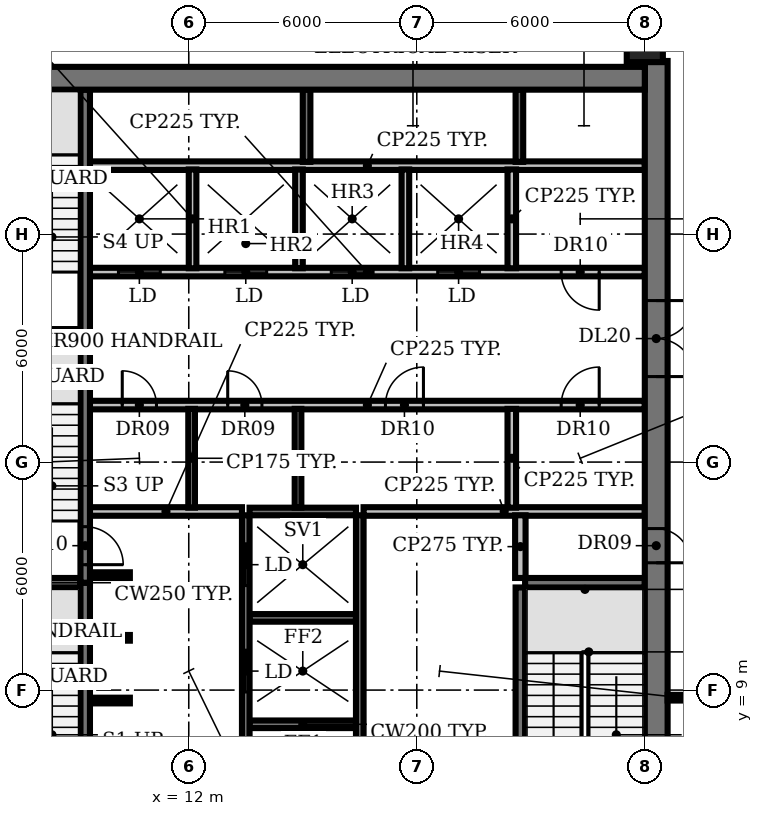
"""IFC4 building model, lengths in metres.
Left out: names, types, materials, properties, quantities, classifications, styles, units other than length and angle.
Written with IfcOpenShell. Run it as: python <this file> out.ifc"""

import sys

from ifc_helpers import new_model, si_unit, direction, frame, frame_2d, origin, origin_2d, place, context, subcontext, project, spatial, rectangle, circle, extrude, element, fill, save


model = new_model("IFC4")
c1 = context("Model", 3, precision=1e-05, world=origin(), true_north=direction((0.0, 1.0)))
c2 = subcontext(c1, "Body", "Model", "MODEL_VIEW")
j1 = project(units=[si_unit("LENGTHUNIT", "METRE"), si_unit("PLANEANGLEUNIT", "RADIAN")], contexts=[c1])
p1 = place(None, origin())
s1 = spatial("IfcSite", under=j1, at=p1, CompositionType="ELEMENT")
p2 = place(p1, origin())
s2 = spatial("IfcBuilding", under=s1, at=p2, CompositionType="ELEMENT")
p3 = place(p2, frame((0.0, 0.0, 188.6)))
s3 = spatial("IfcBuildingStorey", under=s2, at=p3, CompositionType="ELEMENT", Elevation=188.6)
p4 = place(p3, frame((24.0, 26.0, 0.0), z_axis=(0.0, 0.0, 1.0), x_axis=(1.0, 0.0, 0.0)))
e1 = element("IfcColumn", 1, at=p4, inside=s3, PredefinedType="COLUMN", context=c2, shape_type="SweptSolid", body=[
    extrude(circle(Radius=0.475, at=origin_2d()), origin(), (0.0, 0.0, 1.0), 3.85),
])
p5 = place(p3, frame((13.6, 8.1, 0.0), z_axis=(0.0, 0.0, 1.0), x_axis=(1.0, 0.0, 0.0)))
e2 = element("IfcWall", 2, at=p5, inside=s3, PredefinedType="SHEAR", context=c2, shape_type="SweptSolid", body=[
    extrude(rectangle(XDim=2.8, YDim=0.2, at=frame_2d((1.4, 0.0))), origin(), (0.0, 0.0, 1.0), 3.85),
])
for number, where, z_axis, x_axis in (
    (3, (9.4, 8.725, 0.0), (0.0, 0.0, 1.0), (1.0, 0.0, 0.0)),
    (4, (9.4, 10.375, 0.0), (0.0, 0.0, 1.0), (1.0, 0.0, 0.0)),
):
    element("IfcWall", number, at=place(p3, frame(where, z_axis=z_axis, x_axis=x_axis)), inside=s3, PredefinedType="SHEAR", context=c2, shape_type="SweptSolid", body=[
        extrude(rectangle(XDim=1.05, YDim=0.15, at=frame_2d((0.525, 0.0))), origin(), (0.0, 0.0, 1.0), 3.85),
    ])
p6 = place(p3, frame((13.6, 10.9, 0.0), z_axis=(0.0, 0.0, 1.0), x_axis=(1.0, 0.0, 0.0)))
e5 = element("IfcWall", 5, at=p6, inside=s3, PredefinedType="SHEAR", context=c2, shape_type="SweptSolid", body=[
    extrude(rectangle(XDim=2.8, YDim=0.2, at=frame_2d((1.4, 0.0))), origin(), (0.0, 0.0, 1.0), 3.85),
])
for number, where, z_axis, x_axis in (
    (6, (6.0, 11.825, 0.0), (0.0, 0.0, 1.0), (1.0, 0.0, 0.0)),
    (7, (20.85, 11.825, 0.0), (0.0, 0.0, 1.0), (1.0, 0.0, 0.0)),
):
    element("IfcWall", number, at=place(p3, frame(where, z_axis=z_axis, x_axis=x_axis)), inside=s3, PredefinedType="SHEAR", context=c2, shape_type="SweptSolid", body=[
        extrude(rectangle(XDim=3.15, YDim=0.25, at=frame_2d((1.575, 0.0))), origin(), (0.0, 0.0, 1.0), 3.85),
    ])
p7 = place(p3, frame((9.4, 12.025, 0.0), z_axis=(0.0, 0.0, 1.0), x_axis=(1.0, 0.0, 0.0)))
e8 = element("IfcWall", 8, at=p7, inside=s3, PredefinedType="SHEAR", context=c2, shape_type="SweptSolid", body=[
    extrude(rectangle(XDim=1.05, YDim=0.15, at=frame_2d((0.525, 0.0))), origin(), (0.0, 0.0, 1.0), 3.85),
])
p8 = place(p3, frame((9.4, 13.7, 0.0), z_axis=(0.0, 0.0, 1.0), x_axis=(1.0, 0.0, 0.0)))
e9 = element("IfcWall", 9, at=p8, inside=s3, PredefinedType="PARTITIONING", context=c2, shape_type="SweptSolid", body=[
    extrude(rectangle(XDim=4.0, YDim=0.225, at=frame_2d((2.0, 0.0))), origin(), (0.0, 0.0, 1.0), 3.85),
])
p9 = place(p3, frame((13.6, 13.7, 0.0), z_axis=(0.0, 0.0, 1.0), x_axis=(1.0, 0.0, 0.0)))
e10 = element("IfcWall", 10, at=p9, inside=s3, PredefinedType="SHEAR", context=c2, shape_type="SweptSolid", body=[
    extrude(rectangle(XDim=2.8, YDim=0.2, at=frame_2d((1.4, 0.0))), origin(), (0.0, 0.0, 1.0), 3.85),
])
p10 = place(p3, frame((16.6, 13.7, 0.0), z_axis=(0.0, 0.0, 1.0), x_axis=(1.0, 0.0, 0.0)))
e11 = element("IfcWall", 11, at=p10, inside=s3, PredefinedType="PARTITIONING", context=c2, shape_type="SweptSolid", body=[
    extrude(rectangle(XDim=7.4, YDim=0.225, at=frame_2d((3.7, 0.0))), origin(), (0.0, 0.0, 1.0), 3.85),
])
p11 = place(p3, frame((9.4, 16.5, 0.0), z_axis=(0.0, 0.0, 1.0), x_axis=(1.0, 0.0, 0.0)))
e12 = element("IfcWall", 12, at=p11, inside=s3, PredefinedType="PARTITIONING", context=c2, shape_type="SweptSolid", body=[
    extrude(rectangle(XDim=14.6, YDim=0.225, at=frame_2d((7.3, 0.0))), origin(), (0.0, 0.0, 1.0), 3.85),
])
p12 = place(p11, frame((0.85, 0.0, 0.0)))
e13 = element("IfcOpeningElement", 13, at=p12, cuts=e12, PredefinedType="OPENING", context=c2, shape_type="SweptSolid", body=[
    extrude(rectangle(XDim=0.9, YDim=2.1, at=frame_2d((0.45, 1.05))), frame((0.0, 0.123, 0.0), z_axis=(0.0, -1.0, 0.0), x_axis=(1.0, 0.0, 0.0)), (0.0, 0.0, 1.0), 0.245),
])
p13 = place(p11, frame((3.625, 0.0, 0.0)))
e14 = element("IfcOpeningElement", 14, at=p13, cuts=e12, PredefinedType="OPENING", context=c2, shape_type="SweptSolid", body=[
    extrude(rectangle(XDim=0.9, YDim=2.1, at=frame_2d((0.45, 1.05))), frame((0.0, 0.123, 0.0), z_axis=(0.0, -1.0, 0.0), x_axis=(1.0, 0.0, 0.0)), (0.0, 0.0, 1.0), 0.245),
])
p14 = place(p11, frame((7.775, 0.0, 0.0)))
e15 = element("IfcOpeningElement", 15, at=p14, cuts=e12, PredefinedType="OPENING", context=c2, shape_type="SweptSolid", body=[
    extrude(rectangle(XDim=1.0, YDim=2.1, at=frame_2d((0.5, 1.05))), frame((0.0, 0.123, 0.0), z_axis=(0.0, -1.0, 0.0), x_axis=(1.0, 0.0, 0.0)), (0.0, 0.0, 1.0), 0.245),
])
p15 = place(p11, frame((12.4, 0.0, 0.0)))
e16 = element("IfcOpeningElement", 16, at=p15, cuts=e12, PredefinedType="OPENING", context=c2, shape_type="SweptSolid", body=[
    extrude(rectangle(XDim=1.0, YDim=2.1, at=frame_2d((0.5, 1.05))), frame((0.0, 0.123, 0.0), z_axis=(0.0, -1.0, 0.0), x_axis=(1.0, 0.0, 0.0)), (0.0, 0.0, 1.0), 0.245),
])
p16 = place(p3, frame((6.0, 18.375, 0.0), z_axis=(0.0, 0.0, 1.0), x_axis=(1.0, 0.0, 0.0)))
e17 = element("IfcWall", 17, at=p16, inside=s3, PredefinedType="SHEAR", context=c2, shape_type="SweptSolid", body=[
    extrude(rectangle(XDim=3.15, YDim=0.25, at=frame_2d((1.575, 0.0))), origin(), (0.0, 0.0, 1.0), 3.85),
])
p17 = place(p3, frame((24.0, 20.0, 0.0), z_axis=(0.0, 0.0, 1.0), x_axis=(-1.0, 0.0, 0.0)))
e18 = element("IfcWall", 18, at=p17, inside=s3, PredefinedType="PARTITIONING", context=c2, shape_type="SweptSolid", body=[
    extrude(rectangle(XDim=14.6, YDim=0.225, at=frame_2d((7.3, 0.0))), origin(), (0.0, 0.0, 1.0), 3.85),
])
p18 = place(p17, frame((12.75, 0.0, 0.0)))
e19 = element("IfcOpeningElement", 19, at=p18, cuts=e18, PredefinedType="OPENING", context=c2, shape_type="SweptSolid", body=[
    extrude(rectangle(XDim=1.1, YDim=2.1, at=frame_2d((0.55, 1.05))), frame((0.0, 0.123, 0.0), z_axis=(0.0, -1.0, 0.0), x_axis=(1.0, 0.0, 0.0)), (0.0, 0.0, 1.0), 0.245),
])
p19 = place(p17, frame((9.95, 0.0, 0.0)))
e20 = element("IfcOpeningElement", 20, at=p19, cuts=e18, PredefinedType="OPENING", context=c2, shape_type="SweptSolid", body=[
    extrude(rectangle(XDim=1.1, YDim=2.1, at=frame_2d((0.55, 1.05))), frame((0.0, 0.123, 0.0), z_axis=(0.0, -1.0, 0.0), x_axis=(1.0, 0.0, 0.0)), (0.0, 0.0, 1.0), 0.245),
])
p20 = place(p17, frame((7.15, 0.0, 0.0)))
e21 = element("IfcOpeningElement", 21, at=p20, cuts=e18, PredefinedType="OPENING", context=c2, shape_type="SweptSolid", body=[
    extrude(rectangle(XDim=1.1, YDim=2.1, at=frame_2d((0.55, 1.05))), frame((0.0, 0.123, 0.0), z_axis=(0.0, -1.0, 0.0), x_axis=(1.0, 0.0, 0.0)), (0.0, 0.0, 1.0), 0.245),
])
p21 = place(p17, frame((4.35, 0.0, 0.0)))
e22 = element("IfcOpeningElement", 22, at=p21, cuts=e18, PredefinedType="OPENING", context=c2, shape_type="SweptSolid", body=[
    extrude(rectangle(XDim=1.1, YDim=2.1, at=frame_2d((0.55, 1.05))), frame((0.0, 0.123, 0.0), z_axis=(0.0, -1.0, 0.0), x_axis=(1.0, 0.0, 0.0)), (0.0, 0.0, 1.0), 0.245),
])
p22 = place(p17, frame((1.2, 0.0, 0.0)))
e23 = element("IfcOpeningElement", 23, at=p22, cuts=e18, PredefinedType="OPENING", context=c2, shape_type="SweptSolid", body=[
    extrude(rectangle(XDim=1.0, YDim=2.1, at=frame_2d((0.5, 1.05))), frame((0.0, 0.123, 0.0), z_axis=(0.0, -1.0, 0.0), x_axis=(1.0, 0.0, 0.0)), (0.0, 0.0, 1.0), 0.245),
])
p23 = place(p3, frame((9.4, 22.8, 0.0), z_axis=(0.0, 0.0, 1.0), x_axis=(1.0, 0.0, 0.0)))
e24 = element("IfcWall", 24, at=p23, inside=s3, PredefinedType="PARTITIONING", context=c2, shape_type="SweptSolid", body=[
    extrude(rectangle(XDim=14.6, YDim=0.225, at=frame_2d((7.3, 0.0))), origin(), (0.0, 0.0, 1.0), 3.85),
])
p24 = place(p3, frame((9.275, 11.825, 0.0), z_axis=(0.0, 0.0, 1.0), x_axis=(0.0, -1.0, 0.0)))
e25 = element("IfcWall", 25, at=p24, inside=s3, PredefinedType="SHEAR", context=c2, shape_type="SweptSolid", body=[
    extrude(rectangle(XDim=6.425, YDim=0.25, at=frame_2d((3.212, 0.0))), origin(), (0.0, 0.0, 1.0), 3.85),
])
p25 = place(p24, frame((5.075, 0.0, 0.0)))
e26 = element("IfcOpeningElement", 26, at=p25, cuts=e25, PredefinedType="OPENING", context=c2, shape_type="SweptSolid", body=[
    extrude(rectangle(XDim=1.0, YDim=2.1, at=frame_2d((0.5, 1.05))), frame((0.0, 0.135, 0.0), z_axis=(0.0, -1.0, 0.0), x_axis=(1.0, 0.0, 0.0)), (0.0, 0.0, 1.0), 0.27),
])
p26 = place(p3, frame((9.275, 18.375, 0.0), z_axis=(0.0, 0.0, 1.0), x_axis=(0.0, -1.0, 0.0)))
e27 = element("IfcWall", 27, at=p26, inside=s3, PredefinedType="SHEAR", context=c2, shape_type="SweptSolid", body=[
    extrude(rectangle(XDim=6.55, YDim=0.25, at=frame_2d((3.275, 0.0))), origin(), (0.0, 0.0, 1.0), 3.85),
])
p27 = place(p26, frame((5.075, 0.0, 0.0)))
e28 = element("IfcOpeningElement", 28, at=p27, cuts=e27, PredefinedType="OPENING", context=c2, shape_type="SweptSolid", body=[
    extrude(rectangle(XDim=1.0, YDim=2.1, at=frame_2d((0.5, 1.05))), frame((0.0, 0.135, 0.0), z_axis=(0.0, -1.0, 0.0), x_axis=(1.0, 0.0, 0.0)), (0.0, 0.0, 1.0), 0.27),
])
p28 = place(p3, frame((9.275, 18.375, 0.0), z_axis=(0.0, 0.0, 1.0), x_axis=(0.0, 1.0, 0.0)))
e29 = element("IfcWall", 29, at=p28, inside=s3, PredefinedType="SHEAR", context=c2, shape_type="SweptSolid", body=[
    extrude(rectangle(XDim=6.425, YDim=0.25, at=frame_2d((3.212, 0.0))), origin(), (0.0, 0.0, 1.0), 3.85),
])
p29 = place(p3, frame((12.075, 13.8, 0.0), z_axis=(0.0, 0.0, 1.0), x_axis=(0.0, 1.0, 0.0)))
e30 = element("IfcWall", 30, at=p29, inside=s3, PredefinedType="PARTITIONING", context=c2, shape_type="SweptSolid", body=[
    extrude(rectangle(XDim=2.6, YDim=0.175, at=frame_2d((1.3, 0.0))), origin(), (0.0, 0.0, 1.0), 3.85),
])
p30 = place(p3, frame((12.1, 20.1, 0.0), z_axis=(0.0, 0.0, 1.0), x_axis=(0.0, 1.0, 0.0)))
e31 = element("IfcWall", 31, at=p30, inside=s3, PredefinedType="SOLIDWALL", context=c2, shape_type="SweptSolid", body=[
    extrude(rectangle(XDim=2.6, YDim=0.2, at=frame_2d((1.3, 0.0))), origin(), (0.0, 0.0, 1.0), 3.85),
])
p31 = place(p3, frame((13.5, 5.4, 0.0), z_axis=(0.0, 0.0, 1.0), x_axis=(0.0, 1.0, 0.0)))
e32 = element("IfcWall", 32, at=p31, inside=s3, PredefinedType="SHEAR", context=c2, shape_type="SweptSolid", body=[
    extrude(rectangle(XDim=8.2, YDim=0.2, at=frame_2d((4.1, 0.0))), origin(), (0.0, 0.0, 1.0), 3.85),
])
p32 = place(p31, frame((0.75, 0.0, 0.0)))
e33 = element("IfcOpeningElement", 33, at=p32, cuts=e32, PredefinedType="OPENING", context=c2, shape_type="SweptSolid", body=[
    extrude(rectangle(XDim=1.1, YDim=2.1, at=frame_2d((0.55, 1.05))), frame((0.0, 0.11, 0.0), z_axis=(0.0, -1.0, 0.0), x_axis=(1.0, 0.0, 0.0)), (0.0, 0.0, 1.0), 0.22),
])
p33 = place(p31, frame((3.55, 0.0, 0.0)))
e34 = element("IfcOpeningElement", 34, at=p33, cuts=e32, PredefinedType="OPENING", context=c2, shape_type="SweptSolid", body=[
    extrude(rectangle(XDim=1.1, YDim=2.1, at=frame_2d((0.55, 1.05))), frame((0.0, 0.11, 0.0), z_axis=(0.0, -1.0, 0.0), x_axis=(1.0, 0.0, 0.0)), (0.0, 0.0, 1.0), 0.22),
])
p34 = place(p31, frame((6.35, 0.0, 0.0)))
e35 = element("IfcOpeningElement", 35, at=p34, cuts=e32, PredefinedType="OPENING", context=c2, shape_type="SweptSolid", body=[
    extrude(rectangle(XDim=1.1, YDim=2.1, at=frame_2d((0.55, 1.05))), frame((0.0, 0.11, 0.0), z_axis=(0.0, -1.0, 0.0), x_axis=(1.0, 0.0, 0.0)), (0.0, 0.0, 1.0), 0.22),
])
p35 = place(p3, frame((14.875, 13.8, 0.0), z_axis=(0.0, 0.0, 1.0), x_axis=(0.0, 1.0, 0.0)))
e36 = element("IfcWall", 36, at=p35, inside=s3, PredefinedType="PARTITIONING", context=c2, shape_type="SweptSolid", body=[
    extrude(rectangle(XDim=2.6, YDim=0.175, at=frame_2d((1.3, 0.0))), origin(), (0.0, 0.0, 1.0), 3.85),
])
p36 = place(p3, frame((14.9, 20.1, 0.0), z_axis=(0.0, 0.0, 1.0), x_axis=(0.0, 1.0, 0.0)))
e37 = element("IfcWall", 37, at=p36, inside=s3, PredefinedType="SOLIDWALL", context=c2, shape_type="SweptSolid", body=[
    extrude(rectangle(XDim=2.6, YDim=0.2, at=frame_2d((1.3, 0.0))), origin(), (0.0, 0.0, 1.0), 3.85),
])
p37 = place(p3, frame((15.1, 22.9, 0.0), z_axis=(0.0, 0.0, 1.0), x_axis=(0.0, 1.0, 0.0)))
e38 = element("IfcWall", 38, at=p37, inside=s3, PredefinedType="SHEAR", context=c2, shape_type="SweptSolid", body=[
    extrude(rectangle(XDim=1.9, YDim=0.2, at=frame_2d((0.95, 0.0))), origin(), (0.0, 0.0, 1.0), 3.85),
])
p38 = place(p3, frame((16.5, 5.4, 0.0), z_axis=(0.0, 0.0, 1.0), x_axis=(0.0, 1.0, 0.0)))
e39 = element("IfcWall", 39, at=p38, inside=s3, PredefinedType="SHEAR", context=c2, shape_type="SweptSolid", body=[
    extrude(rectangle(XDim=8.2, YDim=0.2, at=frame_2d((4.1, 0.0))), origin(), (0.0, 0.0, 1.0), 3.85),
])
p39 = place(p3, frame((17.7, 20.1, 0.0), z_axis=(0.0, 0.0, 1.0), x_axis=(0.0, 1.0, 0.0)))
e40 = element("IfcWall", 40, at=p39, inside=s3, PredefinedType="SOLIDWALL", context=c2, shape_type="SweptSolid", body=[
    extrude(rectangle(XDim=2.6, YDim=0.2, at=frame_2d((1.3, 0.0))), origin(), (0.0, 0.0, 1.0), 3.85),
])
for number, where, z_axis, x_axis in (
    (41, (20.5, 13.8, 0.0), (0.0, 0.0, 1.0), (0.0, 1.0, 0.0)),
    (42, (20.5, 20.1, 0.0), (0.0, 0.0, 1.0), (0.0, 1.0, 0.0)),
):
    element("IfcWall", number, at=place(p3, frame(where, z_axis=z_axis, x_axis=x_axis)), inside=s3, PredefinedType="PARTITIONING", context=c2, shape_type="SweptSolid", body=[
        extrude(rectangle(XDim=2.6, YDim=0.225, at=frame_2d((1.3, 0.0))), origin(), (0.0, 0.0, 1.0), 3.85),
    ])
p40 = place(p3, frame((20.7, 22.9, 0.0), z_axis=(0.0, 0.0, 1.0), x_axis=(0.0, 1.0, 0.0)))
e43 = element("IfcWall", 43, at=p40, inside=s3, PredefinedType="SHEAR", context=c2, shape_type="SweptSolid", body=[
    extrude(rectangle(XDim=1.9, YDim=0.2, at=frame_2d((0.95, 0.0))), origin(), (0.0, 0.0, 1.0), 3.85),
])
p41 = place(p3, frame((20.725, 5.4, 0.0), z_axis=(0.0, 0.0, 1.0), x_axis=(0.0, 1.0, 0.0)))
e44 = element("IfcWall", 44, at=p41, inside=s3, PredefinedType="SHEAR", context=c2, shape_type="SweptSolid", body=[
    extrude(rectangle(XDim=6.3, YDim=0.25, at=frame_2d((3.15, 0.0))), origin(), (0.0, 0.0, 1.0), 3.85),
])
p42 = place(p3, frame((20.725, 11.95, 0.0), z_axis=(0.0, 0.0, 1.0), x_axis=(0.0, 1.0, 0.0)))
e45 = element("IfcWall", 45, at=p42, inside=s3, PredefinedType="PARTITIONING", context=c2, shape_type="SweptSolid", body=[
    extrude(rectangle(XDim=1.65, YDim=0.275, at=frame_2d((0.825, 0.0))), origin(), (0.0, 0.0, 1.0), 3.85),
])
p43 = place(p3, frame((24.3, 25.555, 0.0), z_axis=(0.0, 0.0, 1.0), x_axis=(0.0, -1.0, 0.0)))
e46 = element("IfcWall", 46, at=p43, inside=s3, PredefinedType="SHEAR", context=c2, shape_type="SweptSolid", body=[
    extrude(rectangle(XDim=20.755, YDim=0.6, at=frame_2d((10.377, 0.0))), origin(), (0.0, 0.0, 1.0), 3.85),
])
p44 = place(p43, frame((18.405, 0.0, 0.0)))
e47 = element("IfcOpeningElement", 47, at=p44, cuts=e46, PredefinedType="OPENING", context=c2, shape_type="SweptSolid", body=[
    extrude(rectangle(XDim=1.5, YDim=2.1, at=frame_2d((0.75, 1.05))), frame((0.0, 0.31, 0.0), z_axis=(0.0, -1.0, 0.0), x_axis=(1.0, 0.0, 0.0)), (0.0, 0.0, 1.0), 0.62),
])
p45 = place(p43, frame((12.305, 0.0, 0.0)))
e48 = element("IfcOpeningElement", 48, at=p45, cuts=e46, PredefinedType="OPENING", context=c2, shape_type="SweptSolid", body=[
    extrude(rectangle(XDim=0.9, YDim=2.1, at=frame_2d((0.45, 1.05))), frame((0.0, 0.31, 0.0), z_axis=(0.0, -1.0, 0.0), x_axis=(1.0, 0.0, 0.0)), (0.0, 0.0, 1.0), 0.62),
])
p46 = place(p43, frame((6.305, 0.0, 0.0)))
e49 = element("IfcOpeningElement", 49, at=p46, cuts=e46, PredefinedType="OPENING", context=c2, shape_type="SweptSolid", body=[
    extrude(rectangle(XDim=2.0, YDim=2.1, at=frame_2d((1.0, 1.05))), frame((0.0, 0.31, 0.0), z_axis=(0.0, -1.0, 0.0), x_axis=(1.0, 0.0, 0.0)), (0.0, 0.0, 1.0), 0.62),
])
p47 = place(p3, frame((6.0, 25.1, 0.0), z_axis=(0.0, 0.0, 1.0), x_axis=(1.0, 0.0, 0.0)))
e50 = element("IfcWall", 50, at=p47, inside=s3, PredefinedType="SHEAR", context=c2, shape_type="SweptSolid", body=[
    extrude(rectangle(XDim=18.0, YDim=0.6, at=frame_2d((9.0, 0.0))), origin(), (0.0, 0.0, 1.0), 3.85),
])
p48 = place(p3, frame((24.6, 8.8, 0.0), z_axis=(0.0, 0.0, 1.0), x_axis=(1.0, 0.0, 0.0)))
e51 = element("IfcWall", 51, at=p48, inside=s3, PredefinedType="PARTITIONING", context=c2, shape_type="SweptSolid", body=[
    extrude(rectangle(XDim=1.05, YDim=0.15, at=frame_2d((0.525, 0.0))), origin(), (0.0, 0.0, 1.0), 2.88),
])
p49 = place(p12, origin())
e52 = element("IfcDoor", 52, at=p49, inside=s3, OperationType="SINGLE_SWING_LEFT", PredefinedType="DOOR", context=c2, shape_type="SweptSolid", body=[
    extrude(rectangle(XDim=0.9, YDim=2.1, at=frame_2d((0.45, 1.05))), frame((0.0, 0.025, 0.0), z_axis=(0.0, -1.0, 0.0), x_axis=(1.0, 0.0, 0.0)), (0.0, 0.0, 1.0), 0.05),
])
fill(e13, e52)
p50 = place(p13, origin())
e53 = element("IfcDoor", 53, at=p50, inside=s3, OperationType="SINGLE_SWING_LEFT", PredefinedType="DOOR", context=c2, shape_type="SweptSolid", body=[
    extrude(rectangle(XDim=0.9, YDim=2.1, at=frame_2d((0.45, 1.05))), frame((0.0, 0.025, 0.0), z_axis=(0.0, -1.0, 0.0), x_axis=(1.0, 0.0, 0.0)), (0.0, 0.0, 1.0), 0.05),
])
fill(e14, e53)
p51 = place(p14, origin())
e54 = element("IfcDoor", 54, at=p51, inside=s3, OperationType="SINGLE_SWING_RIGHT", PredefinedType="DOOR", context=c2, shape_type="SweptSolid", body=[
    extrude(rectangle(XDim=1.0, YDim=2.1, at=frame_2d((0.5, 1.05))), frame((0.0, 0.025, 0.0), z_axis=(0.0, -1.0, 0.0), x_axis=(1.0, 0.0, 0.0)), (0.0, 0.0, 1.0), 0.05),
])
fill(e15, e54)
p52 = place(p15, origin())
e55 = element("IfcDoor", 55, at=p52, inside=s3, OperationType="SINGLE_SWING_RIGHT", PredefinedType="DOOR", context=c2, shape_type="SweptSolid", body=[
    extrude(rectangle(XDim=1.0, YDim=2.1, at=frame_2d((0.5, 1.05))), frame((0.0, 0.025, 0.0), z_axis=(0.0, -1.0, 0.0), x_axis=(1.0, 0.0, 0.0)), (0.0, 0.0, 1.0), 0.05),
])
fill(e16, e55)
p53 = place(p18, origin())
e56 = element("IfcDoor", 56, at=p53, inside=s3, OperationType="DOUBLE_DOOR_SLIDING", PredefinedType="DOOR", context=c2, shape_type="SweptSolid", body=[
    extrude(rectangle(XDim=1.1, YDim=2.1, at=frame_2d((0.55, 1.05))), frame((0.0, 0.025, 0.0), z_axis=(0.0, -1.0, 0.0), x_axis=(1.0, 0.0, 0.0)), (0.0, 0.0, 1.0), 0.05),
])
fill(e19, e56)
p54 = place(p19, origin())
e57 = element("IfcDoor", 57, at=p54, inside=s3, OperationType="DOUBLE_DOOR_SLIDING", PredefinedType="DOOR", context=c2, shape_type="SweptSolid", body=[
    extrude(rectangle(XDim=1.1, YDim=2.1, at=frame_2d((0.55, 1.05))), frame((0.0, 0.025, 0.0), z_axis=(0.0, -1.0, 0.0), x_axis=(1.0, 0.0, 0.0)), (0.0, 0.0, 1.0), 0.05),
])
fill(e20, e57)
p55 = place(p20, origin())
e58 = element("IfcDoor", 58, at=p55, inside=s3, OperationType="DOUBLE_DOOR_SLIDING", PredefinedType="DOOR", context=c2, shape_type="SweptSolid", body=[
    extrude(rectangle(XDim=1.1, YDim=2.1, at=frame_2d((0.55, 1.05))), frame((0.0, 0.025, 0.0), z_axis=(0.0, -1.0, 0.0), x_axis=(1.0, 0.0, 0.0)), (0.0, 0.0, 1.0), 0.05),
])
fill(e21, e58)
p56 = place(p21, origin())
e59 = element("IfcDoor", 59, at=p56, inside=s3, OperationType="DOUBLE_DOOR_SLIDING", PredefinedType="DOOR", context=c2, shape_type="SweptSolid", body=[
    extrude(rectangle(XDim=1.1, YDim=2.1, at=frame_2d((0.55, 1.05))), frame((0.0, 0.025, 0.0), z_axis=(0.0, -1.0, 0.0), x_axis=(1.0, 0.0, 0.0)), (0.0, 0.0, 1.0), 0.05),
])
fill(e22, e59)
p57 = place(p22, origin())
e60 = element("IfcDoor", 60, at=p57, inside=s3, OperationType="SINGLE_SWING_LEFT", PredefinedType="DOOR", context=c2, shape_type="SweptSolid", body=[
    extrude(rectangle(XDim=1.0, YDim=2.1, at=frame_2d((0.5, 1.05))), frame((0.0, 0.025, 0.0), z_axis=(0.0, -1.0, 0.0), x_axis=(1.0, 0.0, 0.0)), (0.0, 0.0, 1.0), 0.05),
])
fill(e23, e60)
p58 = place(p27, origin())
e61 = element("IfcDoor", 61, at=p58, inside=s3, OperationType="SINGLE_SWING_RIGHT", PredefinedType="DOOR", context=c2, shape_type="SweptSolid", body=[
    extrude(rectangle(XDim=1.0, YDim=2.1, at=frame_2d((0.5, 1.05))), frame((0.0, 0.025, 0.0), z_axis=(0.0, -1.0, 0.0), x_axis=(1.0, 0.0, 0.0)), (0.0, 0.0, 1.0), 0.05),
])
fill(e28, e61)
p59 = place(p33, origin())
e62 = element("IfcDoor", 62, at=p59, inside=s3, OperationType="DOUBLE_DOOR_SLIDING", PredefinedType="DOOR", context=c2, shape_type="SweptSolid", body=[
    extrude(rectangle(XDim=1.1, YDim=2.1, at=frame_2d((0.55, 1.05))), frame((0.0, 0.025, 0.0), z_axis=(0.0, -1.0, 0.0), x_axis=(1.0, 0.0, 0.0)), (0.0, 0.0, 1.0), 0.05),
])
fill(e34, e62)
p60 = place(p34, origin())
e63 = element("IfcDoor", 63, at=p60, inside=s3, OperationType="DOUBLE_DOOR_SLIDING", PredefinedType="DOOR", context=c2, shape_type="SweptSolid", body=[
    extrude(rectangle(XDim=1.1, YDim=2.1, at=frame_2d((0.55, 1.05))), frame((0.0, 0.025, 0.0), z_axis=(0.0, -1.0, 0.0), x_axis=(1.0, 0.0, 0.0)), (0.0, 0.0, 1.0), 0.05),
])
fill(e35, e63)
p61 = place(p45, origin())
e64 = element("IfcDoor", 64, at=p61, inside=s3, OperationType="SINGLE_SWING_RIGHT", PredefinedType="DOOR", context=c2, shape_type="SweptSolid", body=[
    extrude(rectangle(XDim=0.9, YDim=2.1, at=frame_2d((0.45, 1.05))), frame((0.0, -0.24, 0.0), z_axis=(0.0, -1.0, 0.0), x_axis=(1.0, 0.0, 0.0)), (0.0, 0.0, 1.0), 0.05),
])
fill(e48, e64)
p62 = place(p46, origin())
e65 = element("IfcDoor", 65, at=p62, inside=s3, OperationType="DOUBLE_DOOR_SINGLE_SWING", PredefinedType="DOOR", context=c2, shape_type="SweptSolid", body=[
    extrude(rectangle(XDim=2.0, YDim=2.1, at=frame_2d((1.0, 1.05))), frame((0.0, 0.025, 0.0), z_axis=(0.0, -1.0, 0.0), x_axis=(1.0, 0.0, 0.0)), (0.0, 0.0, 1.0), 0.05),
])
fill(e49, e65)
save(model, sys.argv[1])
